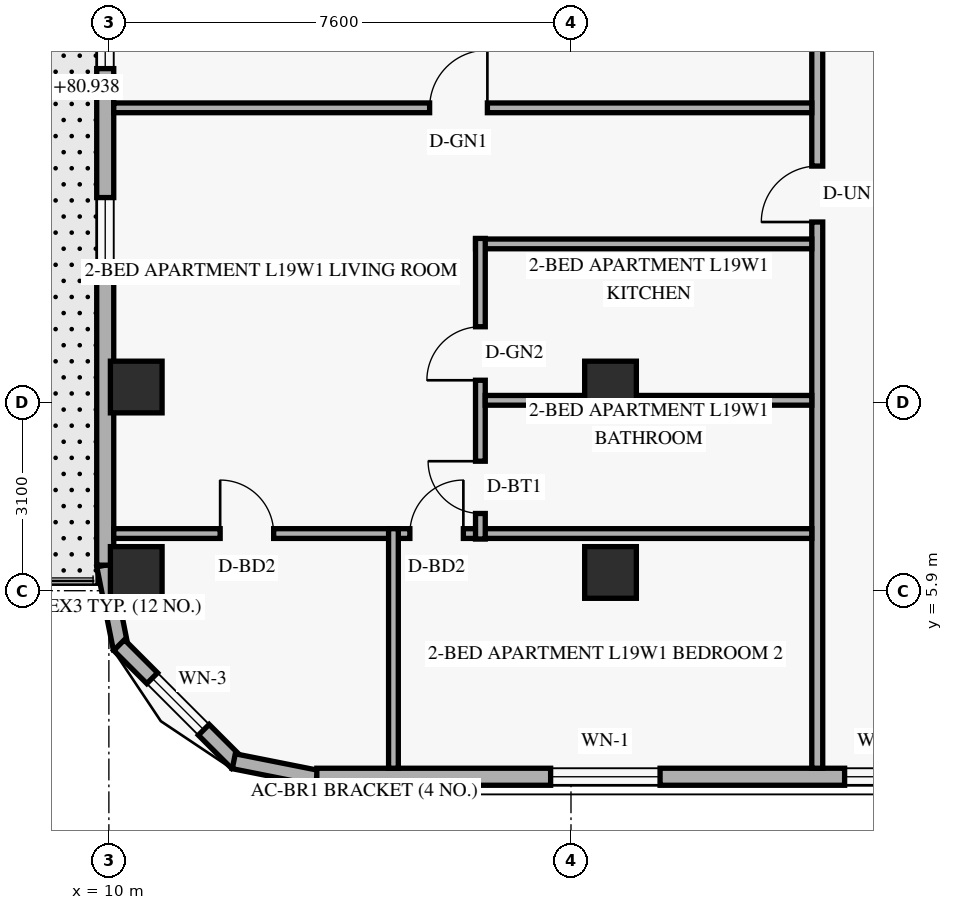
"""IFC4 building model, lengths in metres.
Left out: names, types, materials, properties, quantities, classifications, styles, units other than length and angle.
Written with IfcOpenShell. Run it as: python <this file> out.ifc"""

import sys

from ifc_helpers import new_model, si_unit, direction, frame, frame_2d, origin, origin_2d, place, context, subcontext, project, spatial, rectangle, extrude, element, fill, save


model = new_model("IFC4")
c1 = context("Model", 3, precision=1e-05, world=origin(), true_north=direction((0.0, 1.0)))
c2 = subcontext(c1, "Body", "Model", "MODEL_VIEW")
j1 = project(units=[si_unit("LENGTHUNIT", "METRE"), si_unit("PLANEANGLEUNIT", "RADIAN")], contexts=[c1])
p1 = place(None, origin())
s1 = spatial("IfcSite", under=j1, at=p1, CompositionType="ELEMENT")
p2 = place(p1, origin())
s2 = spatial("IfcBuilding", under=s1, at=p2, CompositionType="ELEMENT")
p3 = place(p2, frame((0.0, 0.0, 76.8)))
s3 = spatial("IfcBuildingStorey", under=s2, at=p3, CompositionType="ELEMENT", Elevation=76.8)
for number, where, z_axis, x_axis in (
    (1, (10.45, 6.2, 0.0), (0.0, 0.0, 1.0), (1.0, 0.0, 0.0)),
    (2, (10.45, 9.25, 0.0), (0.0, 0.0, 1.0), (1.0, 0.0, 0.0)),
    (3, (18.25, 6.2, 0.0), (0.0, 0.0, 1.0), (1.0, 0.0, 0.0)),
    (4, (18.25, 9.25, 0.0), (0.0, 0.0, 1.0), (1.0, 0.0, 0.0)),
):
    element("IfcColumn", number, at=place(p3, frame(where, z_axis=z_axis, x_axis=x_axis)), inside=s3, PredefinedType="COLUMN", context=c2, shape_type="SweptSolid", body=[
        extrude(rectangle(XDim=0.85, YDim=0.85, at=origin_2d()), origin(), (0.0, 0.0, 1.0), 3.6),
    ])
p4 = place(p3, frame((9.924, 6.316, 0.0), z_axis=(0.0, 0.0, 1.0), x_axis=(0.195000137217, -0.980803214965, 0.0)))
e5 = element("IfcWall", 5, at=p4, inside=s3, PredefinedType="SOLIDWALL", context=c2, shape_type="SweptSolid", body=[
    extrude(rectangle(XDim=1.388, YDim=0.25, at=frame_2d((0.694, 0.0))), origin(), (0.0, 0.0, 1.0), 3.36),
])
p5 = place(p3, frame((10.168, 5.005, 0.0), z_axis=(0.0, 0.0, 1.0), x_axis=(0.707151344399, -0.707062215165, 0.0)))
e6 = element("IfcWall", 6, at=p5, inside=s3, PredefinedType="SOLIDWALL", context=c2, shape_type="SweptSolid", body=[
    extrude(rectangle(XDim=2.739, YDim=0.25, at=frame_2d((1.37, 0.0))), origin(), (0.0, 0.0, 1.0), 3.36),
])
p6 = place(p5, frame((0.77, 0.0, 0.85)))
e7 = element("IfcOpeningElement", 7, at=p6, cuts=e6, PredefinedType="OPENING", context=c2, shape_type="SweptSolid", body=[
    extrude(rectangle(XDim=1.2, YDim=1.5, at=frame_2d((0.6, 0.75))), frame((0.0, 0.135, 0.0), z_axis=(0.0, -1.0, 0.0), x_axis=(1.0, 0.0, 0.0)), (0.0, 0.0, 1.0), 0.27),
])
p7 = place(p3, frame((12.054, 3.095, 0.0), z_axis=(0.0, 0.0, 1.0), x_axis=(0.980809899341, -0.19496651342, 0.0)))
e8 = element("IfcWall", 8, at=p7, inside=s3, PredefinedType="SOLIDWALL", context=c2, shape_type="SweptSolid", body=[
    extrude(rectangle(XDim=1.389, YDim=0.25, at=frame_2d((0.694, 0.0))), origin(), (0.0, 0.0, 1.0), 3.36),
])
p8 = place(p3, frame((13.42, 2.84, 0.0), z_axis=(0.0, 0.0, 1.0), x_axis=(1.0, 0.0, 0.0)))
e9 = element("IfcWall", 9, at=p8, inside=s3, PredefinedType="SOLIDWALL", context=c2, shape_type="SweptSolid", body=[
    extrude(rectangle(XDim=36.56, YDim=0.28, at=frame_2d((18.28, 0.0))), origin(), (0.0, 0.0, 1.0), 3.36),
])
p9 = place(p8, frame((3.845, 0.0, 0.85)))
e10 = element("IfcOpeningElement", 10, at=p9, cuts=e9, PredefinedType="OPENING", context=c2, shape_type="SweptSolid", body=[
    extrude(rectangle(XDim=1.8, YDim=1.6, at=frame_2d((0.9, 0.8))), frame((0.0, 0.15, 0.0), z_axis=(0.0, -1.0, 0.0), x_axis=(1.0, 0.0, 0.0)), (0.0, 0.0, 1.0), 0.3),
])
p10 = place(p8, frame((8.68, 0.0, 0.85)))
e11 = element("IfcOpeningElement", 11, at=p10, cuts=e9, PredefinedType="OPENING", context=c2, shape_type="SweptSolid", body=[
    extrude(rectangle(XDim=1.2, YDim=1.5, at=frame_2d((0.6, 0.75))), frame((0.0, 0.15, 0.0), z_axis=(0.0, -1.0, 0.0), x_axis=(1.0, 0.0, 0.0)), (0.0, 0.0, 1.0), 0.3),
])
p11 = place(p8, frame((12.172, 0.0, 0.85)))
e12 = element("IfcOpeningElement", 12, at=p11, cuts=e9, PredefinedType="OPENING", context=c2, shape_type="SweptSolid", body=[
    extrude(rectangle(XDim=1.8, YDim=1.6, at=frame_2d((0.9, 0.8))), frame((0.0, 0.15, 0.0), z_axis=(0.0, -1.0, 0.0), x_axis=(1.0, 0.0, 0.0)), (0.0, 0.0, 1.0), 0.3),
])
p12 = place(p8, frame((18.008, 0.0, 0.85)))
e13 = element("IfcOpeningElement", 13, at=p12, cuts=e9, PredefinedType="OPENING", context=c2, shape_type="SweptSolid", body=[
    extrude(rectangle(XDim=1.8, YDim=1.6, at=frame_2d((0.9, 0.8))), frame((0.0, 0.15, 0.0), z_axis=(0.0, -1.0, 0.0), x_axis=(1.0, 0.0, 0.0)), (0.0, 0.0, 1.0), 0.3),
])
p13 = place(p8, frame((22.465, 0.0, 0.85)))
e14 = element("IfcOpeningElement", 14, at=p13, cuts=e9, PredefinedType="OPENING", context=c2, shape_type="SweptSolid", body=[
    extrude(rectangle(XDim=1.2, YDim=1.5, at=frame_2d((0.6, 0.75))), frame((0.0, 0.15, 0.0), z_axis=(0.0, -1.0, 0.0), x_axis=(1.0, 0.0, 0.0)), (0.0, 0.0, 1.0), 0.3),
])
p14 = place(p8, frame((27.286, 0.0, 0.85)))
e15 = element("IfcOpeningElement", 15, at=p14, cuts=e9, PredefinedType="OPENING", context=c2, shape_type="SweptSolid", body=[
    extrude(rectangle(XDim=1.8, YDim=1.6, at=frame_2d((0.9, 0.8))), frame((0.0, 0.15, 0.0), z_axis=(0.0, -1.0, 0.0), x_axis=(1.0, 0.0, 0.0)), (0.0, 0.0, 1.0), 0.3),
])
p15 = place(p8, frame((33.501, 0.0, 0.85)))
e16 = element("IfcOpeningElement", 16, at=p15, cuts=e9, PredefinedType="OPENING", context=c2, shape_type="SweptSolid", body=[
    extrude(rectangle(XDim=1.8, YDim=1.6, at=frame_2d((0.9, 0.8))), frame((0.0, 0.15, 0.0), z_axis=(0.0, -1.0, 0.0), x_axis=(1.0, 0.0, 0.0)), (0.0, 0.0, 1.0), 0.3),
])
p16 = place(p3, frame((9.94, 41.68, 0.0), z_axis=(0.0, 0.0, 1.0), x_axis=(0.0, -1.0, 0.0)))
e17 = element("IfcWall", 17, at=p16, inside=s3, PredefinedType="SOLIDWALL", context=c2, shape_type="SweptSolid", body=[
    extrude(rectangle(XDim=35.36, YDim=0.28, at=frame_2d((17.68, 0.0))), origin(), (0.0, 0.0, 1.0), 3.36),
])
p17 = place(p16, frame((17.16, 0.0, 0.0)))
e18 = element("IfcOpeningElement", 18, at=p17, cuts=e17, PredefinedType="OPENING", context=c2, shape_type="SweptSolid", body=[
    extrude(rectangle(XDim=1.05, YDim=2.15, at=frame_2d((0.525, 1.075))), frame((0.0, 0.15, 0.0), z_axis=(0.0, -1.0, 0.0), x_axis=(1.0, 0.0, 0.0)), (0.0, 0.0, 1.0), 0.3),
])
p18 = place(p16, frame((12.63, 0.0, 0.0)))
e19 = element("IfcOpeningElement", 19, at=p18, cuts=e17, PredefinedType="OPENING", context=c2, shape_type="SweptSolid", body=[
    extrude(rectangle(XDim=1.4, YDim=2.15, at=frame_2d((0.7, 1.075))), frame((0.0, 0.15, 0.0), z_axis=(0.0, -1.0, 0.0), x_axis=(1.0, 0.0, 0.0)), (0.0, 0.0, 1.0), 0.3),
])
p19 = place(p16, frame((29.314, 0.0, 0.85)))
e20 = element("IfcOpeningElement", 20, at=p19, cuts=e17, PredefinedType="OPENING", context=c2, shape_type="SweptSolid", body=[
    extrude(rectangle(XDim=1.2, YDim=1.5, at=frame_2d((0.6, 0.75))), frame((0.0, 0.15, 0.0), z_axis=(0.0, -1.0, 0.0), x_axis=(1.0, 0.0, 0.0)), (0.0, 0.0, 1.0), 0.3),
])
p20 = place(p16, frame((25.993, 0.0, 0.85)))
e21 = element("IfcOpeningElement", 21, at=p20, cuts=e17, PredefinedType="OPENING", context=c2, shape_type="SweptSolid", body=[
    extrude(rectangle(XDim=1.2, YDim=1.5, at=frame_2d((0.6, 0.75))), frame((0.0, 0.15, 0.0), z_axis=(0.0, -1.0, 0.0), x_axis=(1.0, 0.0, 0.0)), (0.0, 0.0, 1.0), 0.3),
])
p21 = place(p16, frame((21.881, 0.0, 0.85)))
e22 = element("IfcOpeningElement", 22, at=p21, cuts=e17, PredefinedType="OPENING", context=c2, shape_type="SweptSolid", body=[
    extrude(rectangle(XDim=1.2, YDim=1.5, at=frame_2d((0.6, 0.75))), frame((0.0, 0.15, 0.0), z_axis=(0.0, -1.0, 0.0), x_axis=(1.0, 0.0, 0.0)), (0.0, 0.0, 1.0), 0.3),
])
p22 = place(p16, frame((19.401, 0.0, 0.85)))
e23 = element("IfcOpeningElement", 23, at=p22, cuts=e17, PredefinedType="OPENING", context=c2, shape_type="SweptSolid", body=[
    extrude(rectangle(XDim=1.2, YDim=1.5, at=frame_2d((0.6, 0.75))), frame((0.0, 0.15, 0.0), z_axis=(0.0, -1.0, 0.0), x_axis=(1.0, 0.0, 0.0)), (0.0, 0.0, 1.0), 0.3),
])
p23 = place(p16, frame((7.319, 0.0, 0.85)))
e24 = element("IfcOpeningElement", 24, at=p23, cuts=e17, PredefinedType="OPENING", context=c2, shape_type="SweptSolid", body=[
    extrude(rectangle(XDim=1.2, YDim=1.5, at=frame_2d((0.6, 0.75))), frame((0.0, 0.15, 0.0), z_axis=(0.0, -1.0, 0.0), x_axis=(1.0, 0.0, 0.0)), (0.0, 0.0, 1.0), 0.3),
])
p24 = place(p16, frame((0.805, 0.0, 0.85)))
e25 = element("IfcOpeningElement", 25, at=p24, cuts=e17, PredefinedType="OPENING", context=c2, shape_type="SweptSolid", body=[
    extrude(rectangle(XDim=1.2, YDim=1.5, at=frame_2d((0.6, 0.75))), frame((0.0, 0.15, 0.0), z_axis=(0.0, -1.0, 0.0), x_axis=(1.0, 0.0, 0.0)), (0.0, 0.0, 1.0), 0.3),
])
p25 = place(p3, frame((21.65, 2.98, 0.0), z_axis=(0.0, 0.0, 1.0), x_axis=(0.0, 1.0, 0.0)))
e26 = element("IfcWall", 26, at=p25, inside=s3, PredefinedType="STANDARD", context=c2, shape_type="SweptSolid", body=[
    extrude(rectangle(XDim=42.04, YDim=0.18, at=frame_2d((21.02, 0.0))), origin(), (0.0, 0.0, 1.0), 2.731),
])
p26 = place(p25, frame((8.984, 0.0, 0.0)))
e27 = element("IfcOpeningElement", 27, at=p26, cuts=e26, PredefinedType="OPENING", context=c2, shape_type="SweptSolid", body=[
    extrude(rectangle(XDim=0.92, YDim=2.15, at=frame_2d((0.46, 1.075))), frame((0.0, 0.1, 0.0), z_axis=(0.0, -1.0, 0.0), x_axis=(1.0, 0.0, 0.0)), (0.0, 0.0, 1.0), 0.2),
])
p27 = place(p25, frame((18.246, 0.0, 0.0)))
e28 = element("IfcOpeningElement", 28, at=p27, cuts=e26, PredefinedType="OPENING", context=c2, shape_type="SweptSolid", body=[
    extrude(rectangle(XDim=0.92, YDim=2.15, at=frame_2d((0.46, 1.075))), frame((0.0, 0.1, 0.0), z_axis=(0.0, -1.0, 0.0), x_axis=(1.0, 0.0, 0.0)), (0.0, 0.0, 1.0), 0.2),
])
p28 = place(p25, frame((32.836, 0.0, 0.0)))
e29 = element("IfcOpeningElement", 29, at=p28, cuts=e26, PredefinedType="OPENING", context=c2, shape_type="SweptSolid", body=[
    extrude(rectangle(XDim=0.92, YDim=2.15, at=frame_2d((0.46, 1.075))), frame((0.0, 0.1, 0.0), z_axis=(0.0, -1.0, 0.0), x_axis=(1.0, 0.0, 0.0)), (0.0, 0.0, 1.0), 0.2),
])
p29 = place(p3, frame((10.08, 6.84, 0.0), z_axis=(0.0, 0.0, 1.0), x_axis=(1.0, 0.0, 0.0)))
e30 = element("IfcWall", 30, at=p29, inside=s3, PredefinedType="PARTITIONING", context=c2, shape_type="SweptSolid", body=[
    extrude(rectangle(XDim=11.48, YDim=0.16, at=frame_2d((5.74, 0.0))), origin(), (0.0, 0.0, 1.0), 2.731),
])
p30 = place(p29, frame((1.75, 0.0, 0.0)))
e31 = element("IfcOpeningElement", 31, at=p30, cuts=e30, PredefinedType="OPENING", context=c2, shape_type="SweptSolid", body=[
    extrude(rectangle(XDim=0.88, YDim=2.14, at=frame_2d((0.44, 1.07))), frame((0.0, 0.09, 0.0), z_axis=(0.0, -1.0, 0.0), x_axis=(1.0, 0.0, 0.0)), (0.0, 0.0, 1.0), 0.18),
])
p31 = place(p29, frame((4.87, 0.0, 0.0)))
e32 = element("IfcOpeningElement", 32, at=p31, cuts=e30, PredefinedType="OPENING", context=c2, shape_type="SweptSolid", body=[
    extrude(rectangle(XDim=0.88, YDim=2.14, at=frame_2d((0.44, 1.07))), frame((0.0, 0.09, 0.0), z_axis=(0.0, -1.0, 0.0), x_axis=(1.0, 0.0, 0.0)), (0.0, 0.0, 1.0), 0.18),
])
p32 = place(p3, frame((16.03, 11.604, 0.0), z_axis=(0.0, 0.0, 1.0), x_axis=(1.0, 0.0, 0.0)))
e33 = element("IfcWall", 33, at=p32, inside=s3, PredefinedType="PLUMBINGWALL", context=c2, shape_type="SweptSolid", body=[
    extrude(rectangle(XDim=5.53, YDim=0.16, at=frame_2d((2.765, 0.0))), origin(), (0.0, 0.0, 1.0), 2.731),
])
p33 = place(p3, frame((16.11, 6.75, 0.0), z_axis=(0.0, 0.0, 1.0), x_axis=(0.0, 1.0, 0.0)))
e34 = element("IfcWall", 34, at=p33, inside=s3, PredefinedType="PLUMBINGWALL", context=c2, shape_type="SweptSolid", body=[
    extrude(rectangle(XDim=4.944, YDim=0.16, at=frame_2d((2.472, 0.0))), origin(), (0.0, 0.0, 1.0), 2.731),
])
p34 = place(p33, frame((0.42, 0.0, 0.0)))
e35 = element("IfcOpeningElement", 35, at=p34, cuts=e34, PredefinedType="OPENING", context=c2, shape_type="SweptSolid", body=[
    extrude(rectangle(XDim=0.86, YDim=2.12, at=frame_2d((0.43, 1.06))), frame((0.0, 0.09, 0.0), z_axis=(0.0, -1.0, 0.0), x_axis=(1.0, 0.0, 0.0)), (0.0, 0.0, 1.0), 0.18),
])
p35 = place(p33, frame((2.611, 0.0, 0.0)))
e36 = element("IfcOpeningElement", 36, at=p35, cuts=e34, PredefinedType="OPENING", context=c2, shape_type="SweptSolid", body=[
    extrude(rectangle(XDim=0.88, YDim=2.12, at=frame_2d((0.44, 1.06))), frame((0.0, 0.09, 0.0), z_axis=(0.0, -1.0, 0.0), x_axis=(1.0, 0.0, 0.0)), (0.0, 0.0, 1.0), 0.18),
])
p36 = place(p3, frame((16.19, 9.031, 0.0), z_axis=(0.0, 0.0, 1.0), x_axis=(1.0, 0.0, 0.0)))
e37 = element("IfcWall", 37, at=p36, inside=s3, PredefinedType="PLUMBINGWALL", context=c2, shape_type="SweptSolid", body=[
    extrude(rectangle(XDim=5.37, YDim=0.16, at=frame_2d((2.685, 0.0))), origin(), (0.0, 0.0, 1.0), 2.731),
])
p37 = place(p3, frame((10.08, 13.842, 0.0), z_axis=(0.0, 0.0, 1.0), x_axis=(1.0, 0.0, 0.0)))
e38 = element("IfcWall", 38, at=p37, inside=s3, PredefinedType="PARTITIONING", context=c2, shape_type="SweptSolid", body=[
    extrude(rectangle(XDim=11.48, YDim=0.16, at=frame_2d((5.74, 0.0))), origin(), (0.0, 0.0, 1.0), 2.731),
])
p38 = place(p37, frame((5.195, 0.0, 0.0)))
e39 = element("IfcOpeningElement", 39, at=p38, cuts=e38, PredefinedType="OPENING", context=c2, shape_type="SweptSolid", body=[
    extrude(rectangle(XDim=0.95, YDim=2.15, at=frame_2d((0.475, 1.075))), frame((0.0, 0.09, 0.0), z_axis=(0.0, -1.0, 0.0), x_axis=(1.0, 0.0, 0.0)), (0.0, 0.0, 1.0), 0.18),
])
p39 = place(p3, frame((14.68, 2.98, 0.0), z_axis=(0.0, 0.0, 1.0), x_axis=(0.0, 1.0, 0.0)))
e40 = element("IfcWall", 40, at=p39, inside=s3, PredefinedType="PARTITIONING", context=c2, shape_type="SweptSolid", body=[
    extrude(rectangle(XDim=3.94, YDim=0.16, at=frame_2d((1.97, 0.0))), origin(), (0.0, 0.0, 1.0), 2.809),
])
p40 = place(p6, origin())
e41 = element("IfcWindow", 41, at=p40, inside=s3, PartitioningType="SINGLE_PANEL", PredefinedType="WINDOW", context=c2, shape_type="SweptSolid", body=[
    extrude(rectangle(XDim=1.2, YDim=1.5, at=frame_2d((0.6, 0.75))), frame((0.0, 0.03, 0.0), z_axis=(0.0, -1.0, 0.0), x_axis=(1.0, 0.0, 0.0)), (0.0, 0.0, 1.0), 0.06),
])
fill(e7, e41)
p41 = place(p9, origin())
e42 = element("IfcWindow", 42, at=p41, inside=s3, PartitioningType="SINGLE_PANEL", PredefinedType="WINDOW", context=c2, shape_type="SweptSolid", body=[
    extrude(rectangle(XDim=1.8, YDim=1.6, at=frame_2d((0.9, 0.8))), frame((0.0, 0.03, 0.0), z_axis=(0.0, -1.0, 0.0), x_axis=(1.0, 0.0, 0.0)), (0.0, 0.0, 1.0), 0.06),
])
fill(e10, e42)
p42 = place(p10, origin())
e43 = element("IfcWindow", 43, at=p42, inside=s3, PartitioningType="SINGLE_PANEL", PredefinedType="WINDOW", context=c2, shape_type="SweptSolid", body=[
    extrude(rectangle(XDim=1.2, YDim=1.5, at=frame_2d((0.6, 0.75))), frame((0.0, 0.03, 0.0), z_axis=(0.0, -1.0, 0.0), x_axis=(1.0, 0.0, 0.0)), (0.0, 0.0, 1.0), 0.06),
])
fill(e11, e43)
p43 = place(p19, origin())
e44 = element("IfcWindow", 44, at=p43, inside=s3, PartitioningType="SINGLE_PANEL", PredefinedType="WINDOW", context=c2, shape_type="SweptSolid", body=[
    extrude(rectangle(XDim=1.2, YDim=1.5, at=frame_2d((0.6, 0.75))), frame((0.0, 0.03, 0.0), z_axis=(0.0, -1.0, 0.0), x_axis=(1.0, 0.0, 0.0)), (0.0, 0.0, 1.0), 0.06),
])
fill(e20, e44)
p44 = place(p20, origin())
e45 = element("IfcWindow", 45, at=p44, inside=s3, PartitioningType="SINGLE_PANEL", PredefinedType="WINDOW", context=c2, shape_type="SweptSolid", body=[
    extrude(rectangle(XDim=1.2, YDim=1.5, at=frame_2d((0.6, 0.75))), frame((0.0, 0.03, 0.0), z_axis=(0.0, -1.0, 0.0), x_axis=(1.0, 0.0, 0.0)), (0.0, 0.0, 1.0), 0.06),
])
fill(e21, e45)
p45 = place(p38, origin())
e46 = element("IfcDoor", 46, at=p45, inside=s3, OperationType="SINGLE_SWING_RIGHT", PredefinedType="DOOR", context=c2, shape_type="SweptSolid", body=[
    extrude(rectangle(XDim=0.95, YDim=2.15, at=frame_2d((0.475, 1.075))), frame((0.0, 0.025, 0.0), z_axis=(0.0, -1.0, 0.0), x_axis=(1.0, 0.0, 0.0)), (0.0, 0.0, 1.0), 0.05),
])
fill(e39, e46)
p46 = place(p26, origin())
e47 = element("IfcDoor", 47, at=p46, inside=s3, OperationType="SINGLE_SWING_LEFT", PredefinedType="DOOR", context=c2, shape_type="SweptSolid", body=[
    extrude(rectangle(XDim=0.92, YDim=2.15, at=frame_2d((0.46, 1.075))), frame((0.0, 0.025, 0.0), z_axis=(0.0, -1.0, 0.0), x_axis=(1.0, 0.0, 0.0)), (0.0, 0.0, 1.0), 0.05),
])
fill(e27, e47)
p47 = place(p34, origin())
e48 = element("IfcDoor", 48, at=p47, inside=s3, OperationType="SINGLE_SWING_RIGHT", PredefinedType="DOOR", context=c2, shape_type="SweptSolid", body=[
    extrude(rectangle(XDim=0.86, YDim=2.12, at=frame_2d((0.43, 1.06))), frame((0.0, 0.025, 0.0), z_axis=(0.0, -1.0, 0.0), x_axis=(1.0, 0.0, 0.0)), (0.0, 0.0, 1.0), 0.05),
])
fill(e35, e48)
p48 = place(p35, origin())
e49 = element("IfcDoor", 49, at=p48, inside=s3, OperationType="SINGLE_SWING_LEFT", PredefinedType="DOOR", context=c2, shape_type="SweptSolid", body=[
    extrude(rectangle(XDim=0.88, YDim=2.12, at=frame_2d((0.44, 1.06))), frame((0.0, 0.025, 0.0), z_axis=(0.0, -1.0, 0.0), x_axis=(1.0, 0.0, 0.0)), (0.0, 0.0, 1.0), 0.05),
])
fill(e36, e49)
p49 = place(p30, origin())
e50 = element("IfcDoor", 50, at=p49, inside=s3, OperationType="SINGLE_SWING_LEFT", PredefinedType="DOOR", context=c2, shape_type="SweptSolid", body=[
    extrude(rectangle(XDim=0.88, YDim=2.14, at=frame_2d((0.44, 1.07))), frame((0.0, 0.025, 0.0), z_axis=(0.0, -1.0, 0.0), x_axis=(1.0, 0.0, 0.0)), (0.0, 0.0, 1.0), 0.05),
])
fill(e31, e50)
p50 = place(p31, origin())
e51 = element("IfcDoor", 51, at=p50, inside=s3, OperationType="SINGLE_SWING_RIGHT", PredefinedType="DOOR", context=c2, shape_type="SweptSolid", body=[
    extrude(rectangle(XDim=0.88, YDim=2.14, at=frame_2d((0.44, 1.07))), frame((0.0, 0.025, 0.0), z_axis=(0.0, -1.0, 0.0), x_axis=(1.0, 0.0, 0.0)), (0.0, 0.0, 1.0), 0.05),
])
fill(e32, e51)
save(model, sys.argv[1])
